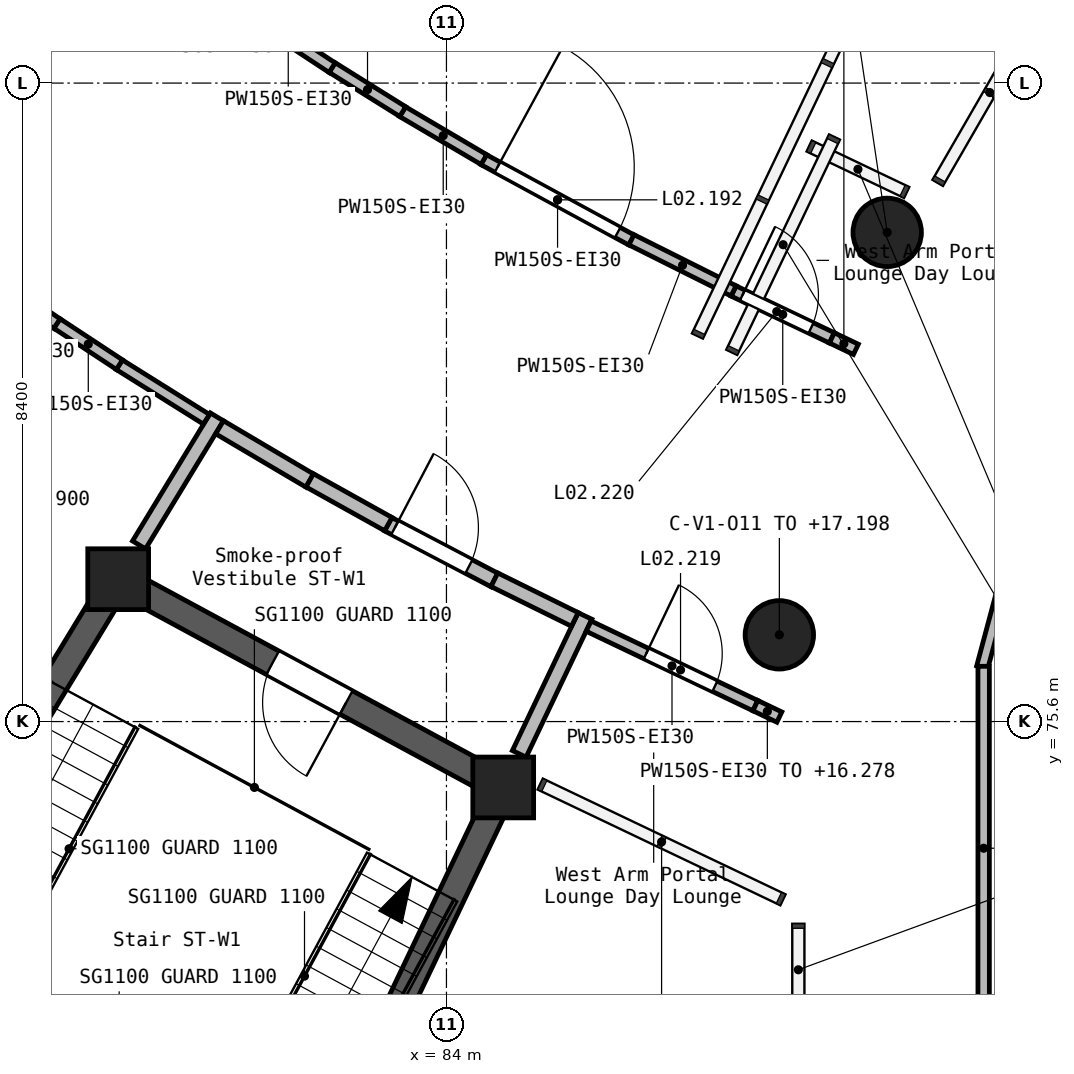
"""IFC4 building model, lengths in metres.
Left out: names, types, materials, properties, quantities, classifications, styles, units other than length and angle.
Written with IfcOpenShell. Run it as: python <this file> out.ifc"""

import sys

from ifc_helpers import new_model, si_unit, direction, frame, frame_2d, origin, origin_2d, place, context, subcontext, project, spatial, rectangle, circle, extrude, element, fill, save


model = new_model("IFC4")
c1 = context("Model", 3, precision=1e-05, world=origin(), true_north=direction((0.0, 1.0)))
c2 = subcontext(c1, "Body", "Model", "MODEL_VIEW")
j1 = project(units=[si_unit("LENGTHUNIT", "METRE"), si_unit("PLANEANGLEUNIT", "RADIAN")], contexts=[c1])
p1 = place(None, origin())
s1 = spatial("IfcSite", under=j1, at=p1, CompositionType="ELEMENT")
p2 = place(p1, origin())
s2 = spatial("IfcBuilding", under=s1, at=p2, CompositionType="ELEMENT")
p3 = place(p2, frame((0.0, 0.0, 12.6)))
s3 = spatial("IfcBuildingStorey", under=s2, at=p3, CompositionType="ELEMENT", Elevation=12.6)
for number, where, z_axis, x_axis in (
    (1, (79.681, 77.473, 0.0), (0.0, 0.0, 1.0), (1.0, 0.0, 0.0)),
    (2, (84.747, 74.733, 0.0), (0.0, 0.0, 1.0), (1.0, 0.0, 0.0)),
):
    element("IfcColumn", number, at=place(p3, frame(where, z_axis=z_axis, x_axis=x_axis)), inside=s3, PredefinedType="COLUMN", context=c2, shape_type="SweptSolid", body=[
        extrude(rectangle(XDim=0.8, YDim=0.8, at=origin_2d()), origin(), (0.0, 0.0, 1.0), 4.2),
    ])
for number, where, z_axis, x_axis in (
    (3, (88.38, 76.741, 0.0), (0.0, 0.0, 1.0), (1.0, 0.0, 0.0)),
    (4, (89.799, 82.036, 0.0), (0.0, 0.0, 1.0), (1.0, 0.0, 0.0)),
):
    element("IfcColumn", number, at=place(p3, frame(where, z_axis=z_axis, x_axis=x_axis)), inside=s3, PredefinedType="COLUMN", context=c2, shape_type="SweptSolid", body=[
        extrude(circle(Radius=0.45, at=origin_2d()), origin(), (0.0, 0.0, 1.0), 4.598),
    ])
p4 = place(p3, frame((75.848, 71.173, 0.0), z_axis=(0.0, 0.0, 1.0), x_axis=(0.51973149438, 0.854329663391, 0.0)))
e5 = element("IfcWall", 5, at=p4, inside=s3, PredefinedType="SHEAR", context=c2, shape_type="SweptSolid", body=[
    extrude(rectangle(XDim=7.55, YDim=0.35, at=frame_2d((3.775, 0.0))), origin(), (0.0, 0.0, 1.0), 4.2),
])
p5 = place(p3, frame((81.572, 68.077, 0.0), z_axis=(0.0, 0.0, 1.0), x_axis=(0.430592498036, 0.90254645345, 0.0)))
e6 = element("IfcWall", 6, at=p5, inside=s3, PredefinedType="SHEAR", context=c2, shape_type="SweptSolid", body=[
    extrude(rectangle(XDim=7.55, YDim=0.35, at=frame_2d((3.775, 0.0))), origin(), (0.0, 0.0, 1.0), 4.2),
])
p6 = place(p3, frame((84.593, 74.816, 0.0), z_axis=(0.0, 0.0, 1.0), x_axis=(-0.879585553739, 0.475740742058, 0.0)))
e7 = element("IfcWall", 7, at=p6, inside=s3, PredefinedType="SHEAR", context=c2, shape_type="SweptSolid", body=[
    extrude(rectangle(XDim=5.409, YDim=0.35, at=frame_2d((2.705, 0.0))), origin(), (0.0, 0.0, 1.0), 4.2),
])
p7 = place(p6, frame((2.174, 0.0, 0.0)))
e8 = element("IfcOpeningElement", 8, at=p7, cuts=e7, PredefinedType="OPENING", context=c2, shape_type="SweptSolid", body=[
    extrude(rectangle(XDim=1.1, YDim=2.1, at=frame_2d((0.55, 1.05))), frame((0.0, 0.185, 0.0), z_axis=(0.0, -1.0, 0.0), x_axis=(1.0, 0.0, 0.0)), (0.0, 0.0, 1.0), 0.37),
])
p8 = place(p3, frame((84.958, 75.175, 0.0), z_axis=(0.0, 0.0, 1.0), x_axis=(0.430419231225, 0.902629096247, 0.0)))
e9 = element("IfcWall", 9, at=p8, inside=s3, PredefinedType="SOLIDWALL", context=c2, shape_type="SweptSolid", body=[
    extrude(rectangle(XDim=2.01, YDim=0.2, at=frame_2d((1.005, 0.0))), origin(), (0.0, 0.0, 1.0), 3.85),
])
p9 = place(p3, frame((79.955, 77.924, 0.0), z_axis=(0.0, 0.0, 1.0), x_axis=(0.519675881268, 0.85436349315, 0.0)))
e10 = element("IfcWall", 10, at=p9, inside=s3, PredefinedType="SOLIDWALL", context=c2, shape_type="SweptSolid", body=[
    extrude(rectangle(XDim=1.972, YDim=0.2, at=frame_2d((0.986, 0.0))), origin(), (0.0, 0.0, 1.0), 3.85),
])
p10 = place(p3, frame((83.232, 78.197, 0.0), z_axis=(0.0, 0.0, 1.0), x_axis=(0.885510751813, -0.464618885134, 0.0)))
e11 = element("IfcWall", 11, at=p10, inside=s3, PredefinedType="SOLIDWALL", context=c2, shape_type="SweptSolid", body=[
    extrude(rectangle(XDim=1.58, YDim=0.2, at=frame_2d((0.79, 0.0))), origin(), (0.0, 0.0, 1.0), 3.85),
])
p11 = place(p10, frame((0.1, 0.0, 0.0)))
e12 = element("IfcOpeningElement", 12, at=p11, cuts=e11, PredefinedType="OPENING", context=c2, shape_type="SweptSolid", body=[
    extrude(rectangle(XDim=1.1, YDim=2.1, at=frame_2d((0.55, 1.05))), frame((0.0, 0.11, 0.0), z_axis=(0.0, -1.0, 0.0), x_axis=(1.0, 0.0, 0.0)), (0.0, 0.0, 1.0), 0.22),
])
p12 = place(p3, frame((81.015, 79.471, 0.0), z_axis=(0.0, 0.0, 1.0), x_axis=(0.860926528214, -0.508729312127, 0.0)))
e13 = element("IfcWall", 13, at=p12, inside=s3, PredefinedType="SOLIDWALL", context=c2, shape_type="SweptSolid", body=[
    extrude(rectangle(XDim=1.379, YDim=0.2, at=frame_2d((0.689, 0.0))), origin(), (0.0, 0.0, 1.0), 3.85),
])
p13 = place(p3, frame((84.631, 77.466, 0.0), z_axis=(0.0, 0.0, 1.0), x_axis=(0.896895597342, -0.442242340203, 0.0)))
e14 = element("IfcWall", 14, at=p13, inside=s3, PredefinedType="SOLIDWALL", context=c2, shape_type="SweptSolid", body=[
    extrude(rectangle(XDim=1.18, YDim=0.2, at=frame_2d((0.59, 0.0))), origin(), (0.0, 0.0, 1.0), 3.85),
])
p14 = place(p3, frame((82.201, 78.774, 0.0), z_axis=(0.0, 0.0, 1.0), x_axis=(0.873621822139, -0.486605499232, 0.0)))
e15 = element("IfcWall", 15, at=p14, inside=s3, PredefinedType="SOLIDWALL", context=c2, shape_type="SweptSolid", body=[
    extrude(rectangle(XDim=1.184, YDim=0.2, at=frame_2d((0.592, 0.0))), origin(), (0.0, 0.0, 1.0), 3.85),
])
p15 = place(p3, frame((91.049, 76.312, 0.0), z_axis=(0.0, 0.0, 1.0), x_axis=(0.258927747961, 0.96589669289, 0.0)))
e16 = element("IfcWall", 16, at=p15, inside=s3, PredefinedType="PARTITIONING", context=c2, shape_type="SweptSolid", body=[
    extrude(rectangle(XDim=4.924, YDim=0.15, at=frame_2d((2.462, 0.0))), origin(), (0.0, 0.0, 1.0), 3.85),
])
p16 = place(p3, frame((91.068, 71.54, 0.0), z_axis=(0.0, 0.0, 1.0), x_axis=(0.0, 1.0, 0.0)))
e17 = element("IfcWall", 17, at=p16, inside=s3, PredefinedType="PARTITIONING", context=c2, shape_type="SweptSolid", body=[
    extrude(rectangle(XDim=4.787, YDim=0.15, at=frame_2d((2.394, 0.0))), origin(), (0.0, 0.0, 1.0), 3.85),
])
p17 = place(p3, frame((85.871, 76.855, 0.0), z_axis=(0.0, 0.0, 1.0), x_axis=(0.902650527198, -0.43037428565, 0.0)))
e18 = element("IfcWall", 18, at=p17, inside=s3, PredefinedType="PARTITIONING", context=c2, shape_type="SweptSolid", body=[
    extrude(rectangle(XDim=2.43, YDim=0.15, at=frame_2d((1.215, 0.0))), origin(), (0.0, 0.0, 1.0), 3.85),
])
p18 = place(p17, frame((0.839, 0.0, 0.0)))
e19 = element("IfcOpeningElement", 19, at=p18, cuts=e18, PredefinedType="OPENING", context=c2, shape_type="SweptSolid", body=[
    extrude(rectangle(XDim=1.0, YDim=2.1, at=frame_2d((0.5, 1.05))), frame((0.0, 0.085, 0.0), z_axis=(0.0, -1.0, 0.0), x_axis=(1.0, 0.0, 0.0)), (0.0, 0.0, 1.0), 0.17),
])
p19 = place(p3, frame((88.064, 75.81, 0.0), z_axis=(0.0, 0.0, 1.0), x_axis=(0.902240472816, -0.431233265429, 0.0)))
e20 = element("IfcWall", 20, at=p19, inside=s3, PredefinedType="PARTITIONING", context=c2, shape_type="SweptSolid", body=[
    extrude(rectangle(XDim=0.35, YDim=0.15, at=frame_2d((0.175, 0.0))), origin(), (0.0, 0.0, 1.0), 3.678),
])
p20 = place(p3, frame((84.489, 82.993, 0.0), z_axis=(0.0, 0.0, 1.0), x_axis=(0.878602388498, -0.47755402095, 0.0)))
e21 = element("IfcWall", 21, at=p20, inside=s3, PredefinedType="PARTITIONING", context=c2, shape_type="SweptSolid", body=[
    extrude(rectangle(XDim=2.215, YDim=0.15, at=frame_2d((1.107, 0.0))), origin(), (0.0, 0.0, 1.0), 3.85),
])
p21 = place(p20, frame((0.207, 0.0, 0.0)))
e22 = element("IfcOpeningElement", 22, at=p21, cuts=e21, PredefinedType="OPENING", context=c2, shape_type="SweptSolid", body=[
    extrude(rectangle(XDim=1.8, YDim=2.1, at=frame_2d((0.9, 1.05))), frame((0.0, 0.085, 0.0), z_axis=(0.0, -1.0, 0.0), x_axis=(1.0, 0.0, 0.0)), (0.0, 0.0, 1.0), 0.17),
])
p22 = place(p3, frame((87.778, 81.264, 0.0), z_axis=(0.0, 0.0, 1.0), x_axis=(0.902557824877, -0.430568662066, 0.0)))
e23 = element("IfcWall", 23, at=p22, inside=s3, PredefinedType="PARTITIONING", context=c2, shape_type="SweptSolid", body=[
    extrude(rectangle(XDim=1.432, YDim=0.15, at=frame_2d((0.716, 0.0))), origin(), (0.0, 0.0, 1.0), 3.85),
])
p23 = place(p22, frame((0.129, 0.0, 0.0)))
e24 = element("IfcOpeningElement", 24, at=p23, cuts=e23, PredefinedType="OPENING", context=c2, shape_type="SweptSolid", body=[
    extrude(rectangle(XDim=1.0, YDim=2.1, at=frame_2d((0.5, 1.05))), frame((0.0, 0.085, 0.0), z_axis=(0.0, -1.0, 0.0), x_axis=(1.0, 0.0, 0.0)), (0.0, 0.0, 1.0), 0.17),
])
p24 = place(p3, frame((89.071, 80.648, 0.0), z_axis=(0.0, 0.0, 1.0), x_axis=(0.902641205527, -0.43039383602, 0.0)))
e25 = element("IfcWall", 25, at=p24, inside=s3, PredefinedType="PARTITIONING", context=c2, shape_type="SweptSolid", body=[
    extrude(rectangle(XDim=0.35, YDim=0.15, at=frame_2d((0.175, 0.0))), origin(), (0.0, 0.0, 1.0), 3.678),
])
p25 = place(p3, frame((86.434, 81.938, 0.0), z_axis=(0.0, 0.0, 1.0), x_axis=(0.894297168166, -0.447473546717, 0.0)))
e26 = element("IfcWall", 26, at=p25, inside=s3, PredefinedType="PARTITIONING", context=c2, shape_type="SweptSolid", body=[
    extrude(rectangle(XDim=1.503, YDim=0.15, at=frame_2d((0.751, 0.0))), origin(), (0.0, 0.0, 1.0), 3.85),
])
p26 = place(p3, frame((79.695, 80.295, 0.0), z_axis=(0.0, 0.0, 1.0), x_axis=(0.847541618724, -0.530728936964, 0.0)))
e27 = element("IfcWall", 27, at=p26, inside=s3, PredefinedType="PARTITIONING", context=c2, shape_type="SweptSolid", body=[
    extrude(rectangle(XDim=1.353, YDim=0.15, at=frame_2d((0.676, 0.0))), origin(), (0.0, 0.0, 1.0), 3.85),
])
p27 = place(p3, frame((77.653, 81.68, 0.0), z_axis=(0.0, 0.0, 1.0), x_axis=(0.822646640465, -0.568552992194, 0.0)))
e28 = element("IfcWall", 28, at=p27, inside=s3, PredefinedType="PARTITIONING", context=c2, shape_type="SweptSolid", body=[
    extrude(rectangle(XDim=1.488, YDim=0.15, at=frame_2d((0.744, 0.0))), origin(), (0.0, 0.0, 1.0), 3.85),
])
p28 = place(p3, frame((81.338, 84.965, 0.0), z_axis=(0.0, 0.0, 1.0), x_axis=(0.834958204617, -0.550313362134, 0.0)))
e29 = element("IfcWall", 29, at=p28, inside=s3, PredefinedType="PARTITIONING", context=c2, shape_type="SweptSolid", body=[
    extrude(rectangle(XDim=1.389, YDim=0.15, at=frame_2d((0.695, 0.0))), origin(), (0.0, 0.0, 1.0), 3.85),
])
p29 = place(p3, frame((83.422, 83.624, 0.0), z_axis=(0.0, 0.0, 1.0), x_axis=(0.861696583626, -0.507423883718, 0.0)))
e30 = element("IfcWall", 30, at=p29, inside=s3, PredefinedType="PARTITIONING", context=c2, shape_type="SweptSolid", body=[
    extrude(rectangle(XDim=1.242, YDim=0.15, at=frame_2d((0.621, 0.0))), origin(), (0.0, 0.0, 1.0), 3.85),
])
p30 = place(p3, frame((82.498, 84.203, 0.0), z_axis=(0.0, 0.0, 1.0), x_axis=(0.848412292862, -0.529335981509, 0.0)))
e31 = element("IfcWall", 31, at=p30, inside=s3, PredefinedType="PARTITIONING", context=c2, shape_type="SweptSolid", body=[
    extrude(rectangle(XDim=1.093, YDim=0.15, at=frame_2d((0.546, 0.0))), origin(), (0.0, 0.0, 1.0), 3.85),
])
p31 = place(p3, frame((78.877, 80.836, 0.0), z_axis=(0.0, 0.0, 1.0), x_axis=(0.835209839134, -0.549931381733, 0.0)))
e32 = element("IfcWall", 32, at=p31, inside=s3, PredefinedType="PARTITIONING", context=c2, shape_type="SweptSolid", body=[
    extrude(rectangle(XDim=0.982, YDim=0.15, at=frame_2d((0.491, 0.0))), origin(), (0.0, 0.0, 1.0), 3.85),
])
p32 = place(p21, frame((1.8, 0.0, 0.0), z_axis=(0.0, 0.0, 1.0), x_axis=(-1.0, 0.0, 0.0)))
e33 = element("IfcDoor", 33, at=p32, inside=s3, OperationType="DOUBLE_DOOR_SINGLE_SWING", PredefinedType="DOOR", context=c2, shape_type="SweptSolid", body=[
    extrude(rectangle(XDim=1.8, YDim=2.1, at=frame_2d((0.9, 1.05))), frame((0.0, 0.025, 0.0), z_axis=(0.0, -1.0, 0.0), x_axis=(1.0, 0.0, 0.0)), (0.0, 0.0, 1.0), 0.05),
])
fill(e22, e33)
p33 = place(p18, frame((1.0, 0.0, 0.0), z_axis=(0.0, 0.0, 1.0), x_axis=(-1.0, 0.0, 0.0)))
e34 = element("IfcDoor", 34, at=p33, inside=s3, OperationType="SINGLE_SWING_LEFT", PredefinedType="DOOR", context=c2, shape_type="SweptSolid", body=[
    extrude(rectangle(XDim=1.0, YDim=2.1, at=frame_2d((0.5, 1.05))), frame((0.0, 0.025, 0.0), z_axis=(0.0, -1.0, 0.0), x_axis=(1.0, 0.0, 0.0)), (0.0, 0.0, 1.0), 0.05),
])
fill(e19, e34)
p34 = place(p23, origin())
e35 = element("IfcDoor", 35, at=p34, inside=s3, OperationType="SINGLE_SWING_LEFT", PredefinedType="DOOR", context=c2, shape_type="SweptSolid", body=[
    extrude(rectangle(XDim=1.0, YDim=2.1, at=frame_2d((0.5, 1.05))), frame((0.0, 0.025, 0.0), z_axis=(0.0, -1.0, 0.0), x_axis=(1.0, 0.0, 0.0)), (0.0, 0.0, 1.0), 0.05),
])
fill(e24, e35)
p35 = place(p7, origin())
e36 = element("IfcDoor", 36, at=p35, inside=s3, OperationType="SINGLE_SWING_RIGHT", PredefinedType="DOOR", context=c2, shape_type="SweptSolid", body=[
    extrude(rectangle(XDim=1.1, YDim=2.1, at=frame_2d((0.55, 1.05))), frame((0.0, 0.025, 0.0), z_axis=(0.0, -1.0, 0.0), x_axis=(1.0, 0.0, 0.0)), (0.0, 0.0, 1.0), 0.05),
])
fill(e8, e36)
p36 = place(p11, frame((1.1, 0.0, 0.0), z_axis=(0.0, 0.0, 1.0), x_axis=(-1.0, 0.0, 0.0)))
e37 = element("IfcDoor", 37, at=p36, inside=s3, OperationType="SINGLE_SWING_RIGHT", PredefinedType="DOOR", context=c2, shape_type="SweptSolid", body=[
    extrude(rectangle(XDim=1.1, YDim=2.1, at=frame_2d((0.55, 1.05))), frame((0.0, 0.025, 0.0), z_axis=(0.0, -1.0, 0.0), x_axis=(1.0, 0.0, 0.0)), (0.0, 0.0, 1.0), 0.05),
])
fill(e12, e37)
save(model, sys.argv[1])
